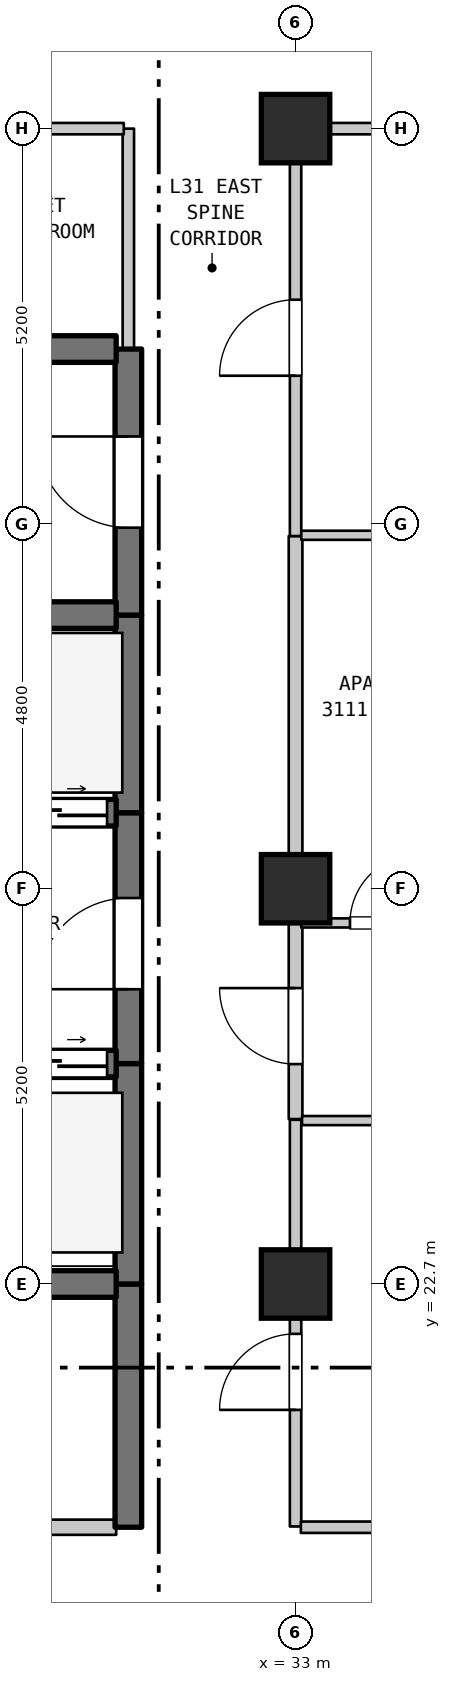
"""IFC4 building model, lengths in metres.
Left out: names, types, materials, properties, quantities, classifications, styles, units other than length and angle.
Written with IfcOpenShell. Run it as: python <this file> out.ifc"""

import sys

from ifc_helpers import new_model, si_unit, direction, frame, frame_2d, origin, origin_2d, place, context, subcontext, project, spatial, rectangle, extrude, element, fill, save


model = new_model("IFC4")
c1 = context("Model", 3, precision=1e-05, world=origin(), true_north=direction((0.0, 1.0)))
c2 = subcontext(c1, "Body", "Model", "MODEL_VIEW")
j1 = project(units=[si_unit("LENGTHUNIT", "METRE"), si_unit("PLANEANGLEUNIT", "RADIAN")], contexts=[c1])
p1 = place(None, origin())
s1 = spatial("IfcSite", under=j1, at=p1, CompositionType="ELEMENT")
p2 = place(p1, origin())
s2 = spatial("IfcBuilding", under=s1, at=p2, CompositionType="ELEMENT")
p3 = place(p2, frame((0.0, 0.0, 129.8)))
s3 = spatial("IfcBuildingStorey", under=s2, at=p3, CompositionType="ELEMENT", Elevation=129.8)
for number, where, z_axis, x_axis in (
    (1, (33.0, 22.7, 0.0), (0.0, 0.0, 1.0), (1.0, 0.0, 0.0)),
    (2, (33.0, 27.9, 0.0), (0.0, 0.0, 1.0), (1.0, 0.0, 0.0)),
    (3, (33.0, 37.9, 0.0), (0.0, 0.0, 1.0), (1.0, 0.0, 0.0)),
):
    element("IfcColumn", number, at=place(p3, frame(where, z_axis=z_axis, x_axis=x_axis)), inside=s3, PredefinedType="COLUMN", context=c2, shape_type="SweptSolid", body=[
        extrude(rectangle(XDim=0.9, YDim=0.9, at=origin_2d()), origin(), (0.0, 0.0, 1.0), 3.7),
    ])
p4 = place(p3, frame((30.8, 19.5, 0.0), z_axis=(0.0, 0.0, 1.0), x_axis=(0.0, 1.0, 0.0)))
e4 = element("IfcWall", 4, at=p4, inside=s3, PredefinedType="SHEAR", context=c2, shape_type="SweptSolid", body=[
    extrude(rectangle(XDim=3.2, YDim=0.35, at=frame_2d((1.6, 0.0))), origin(), (0.0, 0.0, 1.0), 3.385),
])
p5 = place(p3, frame((30.8, 22.7, 0.0), z_axis=(0.0, 0.0, 1.0), x_axis=(0.0, 1.0, 0.0)))
e5 = element("IfcWall", 5, at=p5, inside=s3, PredefinedType="SHEAR", context=c2, shape_type="SweptSolid", body=[
    extrude(rectangle(XDim=2.9, YDim=0.35, at=frame_2d((1.45, 0.0))), origin(), (0.0, 0.0, 1.0), 3.385),
])
p6 = place(p3, frame((30.8, 25.6, 0.0), z_axis=(0.0, 0.0, 1.0), x_axis=(0.0, 1.0, 0.0)))
e6 = element("IfcWall", 6, at=p6, inside=s3, PredefinedType="SHEAR", context=c2, shape_type="SweptSolid", body=[
    extrude(rectangle(XDim=3.3, YDim=0.35, at=frame_2d((1.65, 0.0))), origin(), (0.0, 0.0, 1.0), 3.385),
])
p7 = place(p6, frame((0.978, 0.0, 0.0)))
e7 = element("IfcOpeningElement", 7, at=p7, cuts=e6, PredefinedType="OPENING", context=c2, shape_type="SweptSolid", body=[
    extrude(rectangle(XDim=1.2, YDim=2.2, at=frame_2d((0.6, 1.1))), frame((0.0, 0.185, 0.0), z_axis=(0.0, -1.0, 0.0), x_axis=(1.0, 0.0, 0.0)), (0.0, 0.0, 1.0), 0.37),
])
p8 = place(p3, frame((30.8, 28.9, 0.0), z_axis=(0.0, 0.0, 1.0), x_axis=(0.0, 1.0, 0.0)))
e8 = element("IfcWall", 8, at=p8, inside=s3, PredefinedType="SHEAR", context=c2, shape_type="SweptSolid", body=[
    extrude(rectangle(XDim=2.6, YDim=0.35, at=frame_2d((1.3, 0.0))), origin(), (0.0, 0.0, 1.0), 3.385),
])
p9 = place(p3, frame((30.8, 31.5, 0.0), z_axis=(0.0, 0.0, 1.0), x_axis=(0.0, 1.0, 0.0)))
e9 = element("IfcWall", 9, at=p9, inside=s3, PredefinedType="SHEAR", context=c2, shape_type="SweptSolid", body=[
    extrude(rectangle(XDim=3.5, YDim=0.35, at=frame_2d((1.75, 0.0))), origin(), (0.0, 0.0, 1.0), 3.385),
])
p10 = place(p9, frame((1.15, 0.0, 0.0)))
e10 = element("IfcOpeningElement", 10, at=p10, cuts=e9, PredefinedType="OPENING", context=c2, shape_type="SweptSolid", body=[
    extrude(rectangle(XDim=1.2, YDim=2.2, at=frame_2d((0.6, 1.1))), frame((0.0, 0.185, 0.0), z_axis=(0.0, -1.0, 0.0), x_axis=(1.0, 0.0, 0.0)), (0.0, 0.0, 1.0), 0.37),
])
p11 = place(p3, frame((30.8, 35.0, 0.0), z_axis=(0.0, 0.0, 1.0), x_axis=(0.0, 1.0, 0.0)))
e11 = element("IfcWall", 11, at=p11, inside=s3, PredefinedType="STANDARD", context=c2, shape_type="SweptSolid", body=[
    extrude(rectangle(XDim=2.9, YDim=0.15, at=frame_2d((1.45, 0.0))), origin(), (0.0, 0.0, 1.0), 3.385),
])
p12 = place(p3, frame((33.0, 19.51, 0.0), z_axis=(0.0, 0.0, 1.0), x_axis=(0.0, 1.0, 0.0)))
e12 = element("IfcWall", 12, at=p12, inside=s3, PredefinedType="STANDARD", context=c2, shape_type="SweptSolid", body=[
    extrude(rectangle(XDim=5.35, YDim=0.15, at=frame_2d((2.675, 0.0))), origin(), (0.0, 0.0, 1.0), 2.935),
])
p13 = place(p12, frame((1.534, 0.0, 0.0)))
e13 = element("IfcOpeningElement", 13, at=p13, cuts=e12, PredefinedType="OPENING", context=c2, shape_type="SweptSolid", body=[
    extrude(rectangle(XDim=1.0, YDim=2.15, at=frame_2d((0.5, 1.075))), frame((0.0, 0.085, 0.0), z_axis=(0.0, -1.0, 0.0), x_axis=(1.0, 0.0, 0.0)), (0.0, 0.0, 1.0), 0.17),
])
p14 = place(p3, frame((33.0, 24.87, 0.0), z_axis=(0.0, 0.0, 1.0), x_axis=(0.0, 1.0, 0.0)))
e14 = element("IfcWall", 14, at=p14, inside=s3, PredefinedType="STANDARD", context=c2, shape_type="SweptSolid", body=[
    extrude(rectangle(XDim=2.6, YDim=0.18, at=frame_2d((1.3, 0.0))), origin(), (0.0, 0.0, 1.0), 2.935),
])
p15 = place(p14, frame((0.723, 0.0, 0.0)))
e15 = element("IfcOpeningElement", 15, at=p15, cuts=e14, PredefinedType="OPENING", context=c2, shape_type="SweptSolid", body=[
    extrude(rectangle(XDim=1.0, YDim=2.15, at=frame_2d((0.5, 1.075))), frame((0.0, 0.1, 0.0), z_axis=(0.0, -1.0, 0.0), x_axis=(1.0, 0.0, 0.0)), (0.0, 0.0, 1.0), 0.2),
])
p16 = place(p3, frame((33.0, 27.47, 0.0), z_axis=(0.0, 0.0, 1.0), x_axis=(0.0, 1.0, 0.0)))
e16 = element("IfcWall", 16, at=p16, inside=s3, PredefinedType="STANDARD", context=c2, shape_type="SweptSolid", body=[
    extrude(rectangle(XDim=5.07, YDim=0.18, at=frame_2d((2.535, 0.0))), origin(), (0.0, 0.0, 1.0), 2.885),
])
p17 = place(p3, frame((33.0, 32.54, 0.0), z_axis=(0.0, 0.0, 1.0), x_axis=(0.0, 1.0, 0.0)))
e17 = element("IfcWall", 17, at=p17, inside=s3, PredefinedType="STANDARD", context=c2, shape_type="SweptSolid", body=[
    extrude(rectangle(XDim=5.36, YDim=0.15, at=frame_2d((2.68, 0.0))), origin(), (0.0, 0.0, 1.0), 2.885),
])
p18 = place(p17, frame((2.109, 0.0, 0.0)))
e18 = element("IfcOpeningElement", 18, at=p18, cuts=e17, PredefinedType="OPENING", context=c2, shape_type="SweptSolid", body=[
    extrude(rectangle(XDim=1.0, YDim=2.15, at=frame_2d((0.5, 1.075))), frame((0.0, 0.085, 0.0), z_axis=(0.0, -1.0, 0.0), x_axis=(1.0, 0.0, 0.0)), (0.0, 0.0, 1.0), 0.17),
])
p19 = place(p3, frame((25.985, 19.5, 0.0), z_axis=(0.0, 0.0, 1.0), x_axis=(1.0, 0.0, 0.0)))
e19 = element("IfcWall", 19, at=p19, inside=s3, PredefinedType="STANDARD", context=c2, shape_type="SweptSolid", body=[
    extrude(rectangle(XDim=4.655, YDim=0.2, at=frame_2d((2.327, 0.0))), origin(), (0.0, 0.0, 1.0), 3.385),
])
p20 = place(p19, frame((1.845, 0.0, 0.0)))
e20 = element("IfcOpeningElement", 20, at=p20, cuts=e19, PredefinedType="OPENING", context=c2, shape_type="SweptSolid", body=[
    extrude(rectangle(XDim=0.9, YDim=2.15, at=frame_2d((0.45, 1.075))), frame((0.0, 0.11, 0.0), z_axis=(0.0, -1.0, 0.0), x_axis=(1.0, 0.0, 0.0)), (0.0, 0.0, 1.0), 0.22),
])
p21 = place(p3, frame((33.07, 19.5, 0.0), z_axis=(0.0, 0.0, 1.0), x_axis=(1.0, 0.0, 0.0)))
e21 = element("IfcWall", 21, at=p21, inside=s3, PredefinedType="STANDARD", context=c2, shape_type="SweptSolid", body=[
    extrude(rectangle(XDim=21.51, YDim=0.15, at=frame_2d((10.755, 0.0))), origin(), (0.0, 0.0, 1.0), 3.385),
])
p22 = place(p21, frame((10.185, 0.0, 0.0)))
e22 = element("IfcOpeningElement", 22, at=p22, cuts=e21, PredefinedType="OPENING", context=c2, shape_type="SweptSolid", body=[
    extrude(rectangle(XDim=1.0, YDim=2.15, at=frame_2d((0.5, 1.075))), frame((0.0, 0.085, 0.0), z_axis=(0.0, -1.0, 0.0), x_axis=(1.0, 0.0, 0.0)), (0.0, 0.0, 1.0), 0.17),
])
p23 = place(p3, frame((27.46, 22.7, 0.0), z_axis=(0.0, 0.0, 1.0), x_axis=(1.0, 0.0, 0.0)))
e23 = element("IfcWall", 23, at=p23, inside=s3, PredefinedType="SHEAR", context=c2, shape_type="SweptSolid", body=[
    extrude(rectangle(XDim=3.18, YDim=0.35, at=frame_2d((1.59, 0.0))), origin(), (0.0, 0.0, 1.0), 3.385),
])
p24 = place(p3, frame((33.085, 24.85, 0.0), z_axis=(0.0, 0.0, 1.0), x_axis=(1.0, 0.0, 0.0)))
e24 = element("IfcWall", 24, at=p24, inside=s3, PredefinedType="PARTITIONING", context=c2, shape_type="SweptSolid", body=[
    extrude(rectangle(XDim=23.905, YDim=0.12, at=frame_2d((11.953, 0.0))), origin(), (0.0, 0.0, 1.0), 3.385),
])
p25 = place(p3, frame((27.46, 25.6, 0.0), z_axis=(0.0, 0.0, 1.0), x_axis=(1.0, 0.0, 0.0)))
e25 = element("IfcWall", 25, at=p25, inside=s3, PredefinedType="SHEAR", context=c2, shape_type="SweptSolid", body=[
    extrude(rectangle(XDim=3.18, YDim=0.35, at=frame_2d((1.59, 0.0))), origin(), (0.0, 0.0, 1.0), 3.385),
])
p26 = place(p25, frame((0.12, 0.0, 0.0)))
e26 = element("IfcOpeningElement", 26, at=p26, cuts=e25, PredefinedType="OPENING", context=c2, shape_type="SweptSolid", body=[
    extrude(rectangle(XDim=1.25, YDim=2.2, at=frame_2d((0.625, 1.1))), frame((0.0, 0.185, 0.0), z_axis=(0.0, -1.0, 0.0), x_axis=(1.0, 0.0, 0.0)), (0.0, 0.0, 1.0), 0.37),
])
p27 = place(p25, frame((1.81, 0.0, 0.0)))
e27 = element("IfcOpeningElement", 27, at=p27, cuts=e25, PredefinedType="OPENING", context=c2, shape_type="SweptSolid", body=[
    extrude(rectangle(XDim=1.25, YDim=2.2, at=frame_2d((0.625, 1.1))), frame((0.0, 0.185, 0.0), z_axis=(0.0, -1.0, 0.0), x_axis=(1.0, 0.0, 0.0)), (0.0, 0.0, 1.0), 0.37),
])
p28 = place(p3, frame((33.075, 27.45, 0.0), z_axis=(0.0, 0.0, 1.0), x_axis=(1.0, 0.0, 0.0)))
e28 = element("IfcWall", 28, at=p28, inside=s3, PredefinedType="PARTITIONING", context=c2, shape_type="SweptSolid", body=[
    extrude(rectangle(XDim=2.364, YDim=0.12, at=frame_2d((1.182, 0.0))), origin(), (0.0, 0.0, 1.0), 3.385),
])
p29 = place(p28, frame((0.641, 0.0, 0.0)))
e29 = element("IfcOpeningElement", 29, at=p29, cuts=e28, PredefinedType="OPENING", context=c2, shape_type="SweptSolid", body=[
    extrude(rectangle(XDim=0.9, YDim=2.15, at=frame_2d((0.45, 1.075))), frame((0.0, 0.07, 0.0), z_axis=(0.0, -1.0, 0.0), x_axis=(1.0, 0.0, 0.0)), (0.0, 0.0, 1.0), 0.14),
])
p30 = place(p3, frame((27.46, 28.9, 0.0), z_axis=(0.0, 0.0, 1.0), x_axis=(1.0, 0.0, 0.0)))
e30 = element("IfcWall", 30, at=p30, inside=s3, PredefinedType="SHEAR", context=c2, shape_type="SweptSolid", body=[
    extrude(rectangle(XDim=3.18, YDim=0.35, at=frame_2d((1.59, 0.0))), origin(), (0.0, 0.0, 1.0), 3.385),
])
p31 = place(p30, frame((0.12, 0.0, 0.0)))
e31 = element("IfcOpeningElement", 31, at=p31, cuts=e30, PredefinedType="OPENING", context=c2, shape_type="SweptSolid", body=[
    extrude(rectangle(XDim=1.25, YDim=2.2, at=frame_2d((0.625, 1.1))), frame((0.0, 0.185, 0.0), z_axis=(0.0, -1.0, 0.0), x_axis=(1.0, 0.0, 0.0)), (0.0, 0.0, 1.0), 0.37),
])
p32 = place(p30, frame((1.81, 0.0, 0.0)))
e32 = element("IfcOpeningElement", 32, at=p32, cuts=e30, PredefinedType="OPENING", context=c2, shape_type="SweptSolid", body=[
    extrude(rectangle(XDim=1.25, YDim=2.2, at=frame_2d((0.625, 1.1))), frame((0.0, 0.185, 0.0), z_axis=(0.0, -1.0, 0.0), x_axis=(1.0, 0.0, 0.0)), (0.0, 0.0, 1.0), 0.37),
])
p33 = place(p3, frame((27.46, 31.5, 0.0), z_axis=(0.0, 0.0, 1.0), x_axis=(1.0, 0.0, 0.0)))
e33 = element("IfcWall", 33, at=p33, inside=s3, PredefinedType="SHEAR", context=c2, shape_type="SweptSolid", body=[
    extrude(rectangle(XDim=3.18, YDim=0.35, at=frame_2d((1.59, 0.0))), origin(), (0.0, 0.0, 1.0), 3.385),
])
p34 = place(p3, frame((33.075, 32.55, 0.0), z_axis=(0.0, 0.0, 1.0), x_axis=(1.0, 0.0, 0.0)))
e34 = element("IfcWall", 34, at=p34, inside=s3, PredefinedType="PARTITIONING", context=c2, shape_type="SweptSolid", body=[
    extrude(rectangle(XDim=2.364, YDim=0.12, at=frame_2d((1.182, 0.0))), origin(), (0.0, 0.0, 1.0), 3.385),
])
p35 = place(p3, frame((26.645, 35.0, 0.0), z_axis=(0.0, 0.0, 1.0), x_axis=(1.0, 0.0, 0.0)))
e35 = element("IfcWall", 35, at=p35, inside=s3, PredefinedType="SHEAR", context=c2, shape_type="SweptSolid", body=[
    extrude(rectangle(XDim=3.995, YDim=0.35, at=frame_2d((1.998, 0.0))), origin(), (0.0, 0.0, 1.0), 3.385),
])
p36 = place(p35, frame((1.508, 0.0, 0.0)))
e36 = element("IfcOpeningElement", 36, at=p36, cuts=e35, PredefinedType="OPENING", context=c2, shape_type="SweptSolid", body=[
    extrude(rectangle(XDim=0.95, YDim=2.15, at=frame_2d((0.475, 1.075))), frame((0.0, 0.185, 0.0), z_axis=(0.0, -1.0, 0.0), x_axis=(1.0, 0.0, 0.0)), (0.0, 0.0, 1.0), 0.37),
])
p37 = place(p3, frame((26.645, 37.9, 0.0), z_axis=(0.0, 0.0, 1.0), x_axis=(1.0, 0.0, 0.0)))
e37 = element("IfcWall", 37, at=p37, inside=s3, PredefinedType="STANDARD", context=c2, shape_type="SweptSolid", body=[
    extrude(rectangle(XDim=4.095, YDim=0.15, at=frame_2d((2.047, 0.0))), origin(), (0.0, 0.0, 1.0), 2.885),
])
p38 = place(p3, frame((33.06, 37.9, 0.0), z_axis=(0.0, 0.0, 1.0), x_axis=(1.0, 0.0, 0.0)))
e38 = element("IfcWall", 38, at=p38, inside=s3, PredefinedType="STANDARD", context=c2, shape_type="SweptSolid", body=[
    extrude(rectangle(XDim=11.879, YDim=0.15, at=frame_2d((5.939, 0.0))), origin(), (0.0, 0.0, 1.0), 3.385),
])
p39 = place(p38, frame((5.439, 0.0, 0.0)))
e39 = element("IfcOpeningElement", 39, at=p39, cuts=e38, PredefinedType="OPENING", context=c2, shape_type="SweptSolid", body=[
    extrude(rectangle(XDim=1.0, YDim=2.15, at=frame_2d((0.5, 1.075))), frame((0.0, 0.085, 0.0), z_axis=(0.0, -1.0, 0.0), x_axis=(1.0, 0.0, 0.0)), (0.0, 0.0, 1.0), 0.17),
])
p40 = place(p7, origin())
e40 = element("IfcDoor", 40, at=p40, inside=s3, OperationType="SINGLE_SWING_LEFT", PredefinedType="DOOR", context=c2, shape_type="SweptSolid", body=[
    extrude(rectangle(XDim=1.2, YDim=2.2, at=frame_2d((0.6, 1.1))), frame((0.0, 0.025, 0.0), z_axis=(0.0, -1.0, 0.0), x_axis=(1.0, 0.0, 0.0)), (0.0, 0.0, 1.0), 0.05),
])
fill(e7, e40)
p41 = place(p10, origin())
e41 = element("IfcDoor", 41, at=p41, inside=s3, OperationType="SINGLE_SWING_RIGHT", PredefinedType="DOOR", context=c2, shape_type="SweptSolid", body=[
    extrude(rectangle(XDim=1.2, YDim=2.2, at=frame_2d((0.6, 1.1))), frame((0.0, 0.025, 0.0), z_axis=(0.0, -1.0, 0.0), x_axis=(1.0, 0.0, 0.0)), (0.0, 0.0, 1.0), 0.05),
])
fill(e10, e41)
p42 = place(p13, origin())
e42 = element("IfcDoor", 42, at=p42, inside=s3, OperationType="SINGLE_SWING_LEFT", PredefinedType="DOOR", context=c2, shape_type="SweptSolid", body=[
    extrude(rectangle(XDim=1.0, YDim=2.15, at=frame_2d((0.5, 1.075))), frame((0.0, 0.025, 0.0), z_axis=(0.0, -1.0, 0.0), x_axis=(1.0, 0.0, 0.0)), (0.0, 0.0, 1.0), 0.05),
])
fill(e13, e42)
p43 = place(p15, origin())
e43 = element("IfcDoor", 43, at=p43, inside=s3, OperationType="SINGLE_SWING_RIGHT", PredefinedType="DOOR", context=c2, shape_type="SweptSolid", body=[
    extrude(rectangle(XDim=1.0, YDim=2.15, at=frame_2d((0.5, 1.075))), frame((0.0, 0.025, 0.0), z_axis=(0.0, -1.0, 0.0), x_axis=(1.0, 0.0, 0.0)), (0.0, 0.0, 1.0), 0.05),
])
fill(e15, e43)
p44 = place(p18, origin())
e44 = element("IfcDoor", 44, at=p44, inside=s3, OperationType="SINGLE_SWING_LEFT", PredefinedType="DOOR", context=c2, shape_type="SweptSolid", body=[
    extrude(rectangle(XDim=1.0, YDim=2.15, at=frame_2d((0.5, 1.075))), frame((0.0, 0.025, 0.0), z_axis=(0.0, -1.0, 0.0), x_axis=(1.0, 0.0, 0.0)), (0.0, 0.0, 1.0), 0.05),
])
fill(e18, e44)
p45 = place(p27, origin())
e45 = element("IfcDoor", 45, at=p45, inside=s3, OperationType="DOUBLE_DOOR_SLIDING", PredefinedType="DOOR", context=c2, shape_type="SweptSolid", body=[
    extrude(rectangle(XDim=1.25, YDim=2.2, at=frame_2d((0.625, 1.1))), frame((0.0, 0.025, 0.0), z_axis=(0.0, -1.0, 0.0), x_axis=(1.0, 0.0, 0.0)), (0.0, 0.0, 1.0), 0.05),
])
fill(e27, e45)
p46 = place(p29, origin())
e46 = element("IfcDoor", 46, at=p46, inside=s3, OperationType="SINGLE_SWING_RIGHT", PredefinedType="DOOR", context=c2, shape_type="SweptSolid", body=[
    extrude(rectangle(XDim=0.9, YDim=2.15, at=frame_2d((0.45, 1.075))), frame((0.0, 0.025, 0.0), z_axis=(0.0, -1.0, 0.0), x_axis=(1.0, 0.0, 0.0)), (0.0, 0.0, 1.0), 0.05),
])
fill(e29, e46)
p47 = place(p32, origin())
e47 = element("IfcDoor", 47, at=p47, inside=s3, OperationType="DOUBLE_DOOR_SLIDING", PredefinedType="DOOR", context=c2, shape_type="SweptSolid", body=[
    extrude(rectangle(XDim=1.25, YDim=2.2, at=frame_2d((0.625, 1.1))), frame((0.0, 0.025, 0.0), z_axis=(0.0, -1.0, 0.0), x_axis=(1.0, 0.0, 0.0)), (0.0, 0.0, 1.0), 0.05),
])
fill(e32, e47)
save(model, sys.argv[1])
